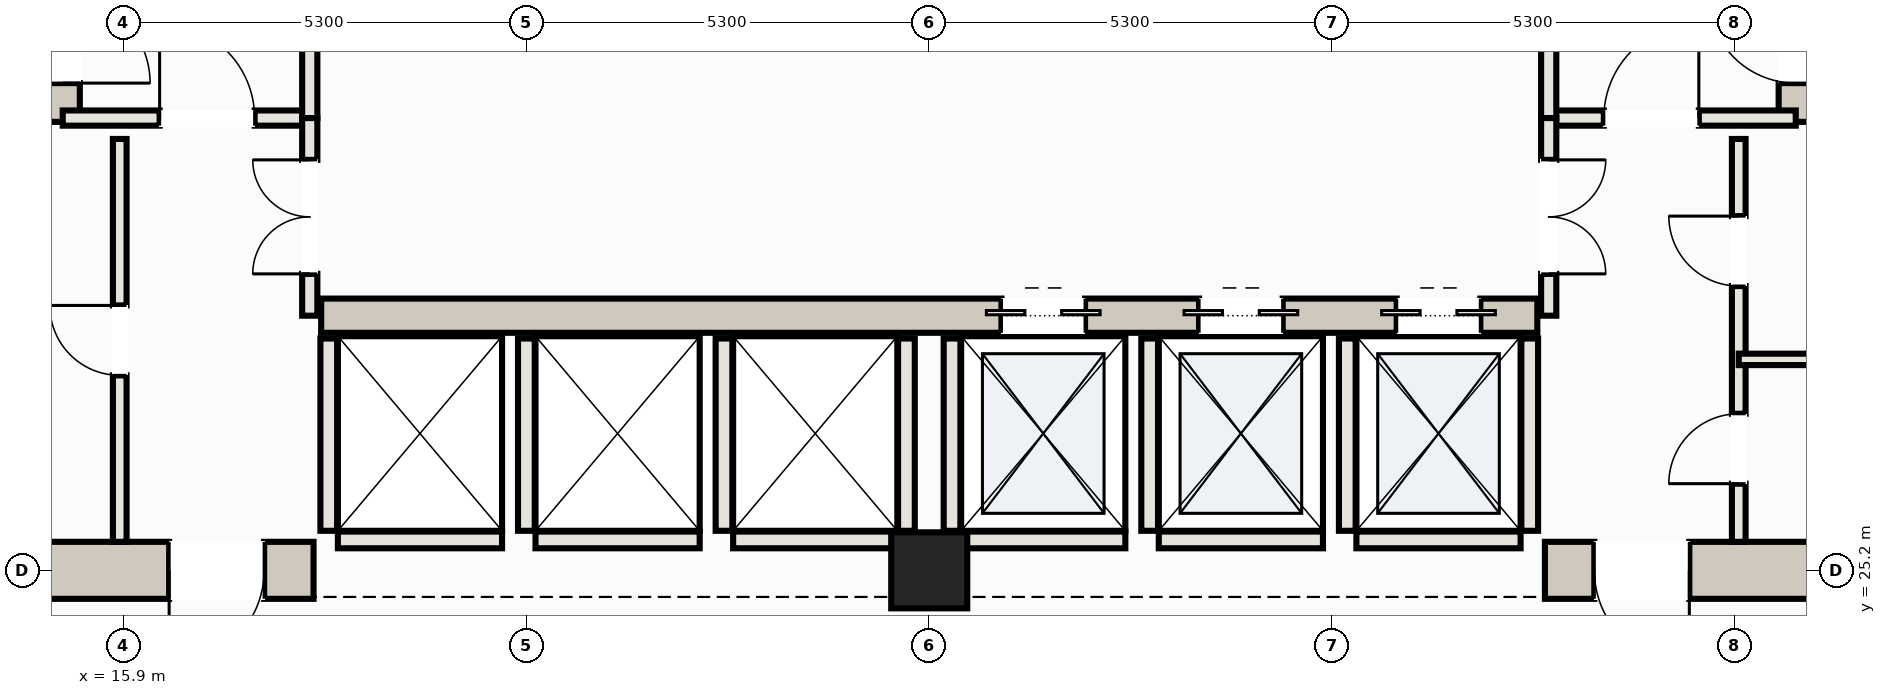
"""IFC4 building model, lengths in metres.
Left out: names, types, materials, properties, quantities, classifications, styles, units other than length and angle.
Written with IfcOpenShell. Run it as: python <this file> out.ifc"""

import sys

from ifc_helpers import new_model, si_unit, direction, frame, frame_2d, origin, origin_2d, place, context, subcontext, project, spatial, rectangle, hollow_rectangle, extrude, element, fill, save


model = new_model("IFC4")
c1 = context("Model", 3, precision=1e-05, world=origin(), true_north=direction((0.0, 1.0)))
c2 = subcontext(c1, "Body", "Model", "MODEL_VIEW")
j1 = project(units=[si_unit("LENGTHUNIT", "METRE"), si_unit("PLANEANGLEUNIT", "RADIAN")], contexts=[c1])
p1 = place(None, origin())
s1 = spatial("IfcSite", under=j1, at=p1, CompositionType="ELEMENT")
p2 = place(p1, origin())
s2 = spatial("IfcBuilding", under=s1, at=p2, CompositionType="ELEMENT")
p3 = place(p2, frame((0.0, 0.0, 81.7)))
s3 = spatial("IfcBuildingStorey", under=s2, at=p3, CompositionType="ELEMENT", Elevation=81.7)
p4 = place(p3, frame((10.225, 25.2, 0.0), z_axis=(0.0, 0.0, 1.0), x_axis=(1.0, 0.0, 0.0)))
e1 = element("IfcWall", 1, at=p4, inside=s3, PredefinedType="SHEAR", context=c2, shape_type="SweptSolid", body=[
    extrude(rectangle(XDim=8.175, YDim=0.75, at=frame_2d((4.087, 0.0))), origin(), (0.0, 0.0, 1.0), 3.09),
])
p5 = place(p4, frame((6.275, 0.0, 0.0)))
e2 = element("IfcOpeningElement", 2, at=p5, cuts=e1, PredefinedType="OPENING", context=c2, shape_type="SweptSolid", body=[
    extrude(rectangle(XDim=1.25, YDim=2.2, at=frame_2d((0.625, 1.1))), frame((0.0, 0.385, 0.0), z_axis=(0.0, -1.0, 0.0), x_axis=(1.0, 0.0, 0.0)), (0.0, 0.0, 1.0), 0.77),
])
p6 = place(p3, frame((34.6, 25.2, 0.0), z_axis=(0.0, 0.0, 1.0), x_axis=(1.0, 0.0, 0.0)))
e3 = element("IfcWall", 3, at=p6, inside=s3, PredefinedType="SHEAR", context=c2, shape_type="SweptSolid", body=[
    extrude(rectangle(XDim=8.175, YDim=0.75, at=frame_2d((4.087, 0.0))), origin(), (0.0, 0.0, 1.0), 3.09),
])
p7 = place(p6, frame((0.65, 0.0, 0.0)))
e4 = element("IfcOpeningElement", 4, at=p7, cuts=e3, PredefinedType="OPENING", context=c2, shape_type="SweptSolid", body=[
    extrude(rectangle(XDim=1.25, YDim=2.2, at=frame_2d((0.625, 1.1))), frame((0.0, 0.385, 0.0), z_axis=(0.0, -1.0, 0.0), x_axis=(1.0, 0.0, 0.0)), (0.0, 0.0, 1.0), 0.77),
])
p8 = place(p3, frame((15.1, 31.1, 0.0), z_axis=(0.0, 0.0, 1.0), x_axis=(0.0, 1.0, 0.0)))
e5 = element("IfcWall", 5, at=p8, inside=s3, PredefinedType="SHEAR", context=c2, shape_type="SweptSolid", body=[
    extrude(rectangle(XDim=8.525, YDim=0.45, at=frame_2d((4.262, 0.0))), origin(), (0.0, 0.0, 1.0), 3.09),
])
p9 = place(p8, frame((0.51, 0.0, 0.0)))
e6 = element("IfcOpeningElement", 6, at=p9, cuts=e5, PredefinedType="OPENING", context=c2, shape_type="SweptSolid", body=[
    extrude(rectangle(XDim=1.15, YDim=2.2, at=frame_2d((0.575, 1.1))), frame((0.0, 0.235, 0.0), z_axis=(0.0, -1.0, 0.0), x_axis=(1.0, 0.0, 0.0)), (0.0, 0.0, 1.0), 0.47),
])
p10 = place(p3, frame((37.9, 31.1, 0.0), z_axis=(0.0, 0.0, 1.0), x_axis=(0.0, 1.0, 0.0)))
e7 = element("IfcWall", 7, at=p10, inside=s3, PredefinedType="SHEAR", context=c2, shape_type="SweptSolid", body=[
    extrude(rectangle(XDim=8.525, YDim=0.45, at=frame_2d((4.262, 0.0))), origin(), (0.0, 0.0, 1.0), 3.09),
])
p11 = place(p10, frame((0.51, 0.0, 0.0)))
e8 = element("IfcOpeningElement", 8, at=p11, cuts=e7, PredefinedType="OPENING", context=c2, shape_type="SweptSolid", body=[
    extrude(rectangle(XDim=1.15, YDim=2.2, at=frame_2d((0.575, 1.1))), frame((0.0, 0.235, 0.0), z_axis=(0.0, -1.0, 0.0), x_axis=(1.0, 0.0, 0.0)), (0.0, 0.0, 1.0), 0.47),
])
p12 = place(p3, frame((18.5, 28.55, 0.0), z_axis=(0.0, 0.0, 1.0), x_axis=(1.0, 0.0, 0.0)))
e9 = element("IfcWall", 9, at=p12, inside=s3, PredefinedType="SHEAR", context=c2, shape_type="SweptSolid", body=[
    extrude(rectangle(XDim=16.0, YDim=0.45, at=frame_2d((8.0, 0.0))), origin(), (0.0, 0.0, 1.0), 3.09),
])
p13 = place(p12, frame((8.95, 0.0, 0.0)))
e10 = element("IfcOpeningElement", 10, at=p13, cuts=e9, PredefinedType="OPENING", context=c2, shape_type="SweptSolid", body=[
    extrude(rectangle(XDim=1.1, YDim=2.15, at=frame_2d((0.55, 1.075))), frame((0.0, 0.235, 0.0), z_axis=(0.0, -1.0, 0.0), x_axis=(1.0, 0.0, 0.0)), (0.0, 0.0, 1.0), 0.47),
])
p14 = place(p12, frame((11.55, 0.0, 0.0)))
e11 = element("IfcOpeningElement", 11, at=p14, cuts=e9, PredefinedType="OPENING", context=c2, shape_type="SweptSolid", body=[
    extrude(rectangle(XDim=1.1, YDim=2.15, at=frame_2d((0.55, 1.075))), frame((0.0, 0.235, 0.0), z_axis=(0.0, -1.0, 0.0), x_axis=(1.0, 0.0, 0.0)), (0.0, 0.0, 1.0), 0.47),
])
p15 = place(p12, frame((14.15, 0.0, 0.0)))
e12 = element("IfcOpeningElement", 12, at=p15, cuts=e9, PredefinedType="OPENING", context=c2, shape_type="SweptSolid", body=[
    extrude(rectangle(XDim=1.1, YDim=2.15, at=frame_2d((0.55, 1.075))), frame((0.0, 0.235, 0.0), z_axis=(0.0, -1.0, 0.0), x_axis=(1.0, 0.0, 0.0)), (0.0, 0.0, 1.0), 0.47),
])
p16 = place(p3, frame((26.5, 25.2, 0.0), z_axis=(0.0, 0.0, 1.0), x_axis=(1.0, 0.0, 0.0)))
e13 = element("IfcColumn", 13, at=p16, inside=s3, PredefinedType="COLUMN", context=c2, shape_type="SweptSolid", body=[
    extrude(hollow_rectangle(XDim=1.0, YDim=1.0, WallThickness=0.036, at=origin_2d()), origin(), (0.0, 0.0, 1.0), 3.3),
])
p17 = place(p3, frame((18.6, 25.72, 0.0), z_axis=(0.0, 0.0, 1.0), x_axis=(0.0, 1.0, 0.0)))
e14 = element("IfcWall", 14, at=p17, inside=s3, PredefinedType="SOLIDWALL", context=c2, shape_type="SweptSolid", body=[
    extrude(rectangle(XDim=2.53, YDim=0.22, at=frame_2d((1.265, 0.0))), origin(), (0.0, 0.0, 1.0), 3.09),
])
p18 = place(p3, frame((18.72, 25.6, 0.0), z_axis=(0.0, 0.0, 1.0), x_axis=(1.0, 0.0, 0.0)))
e15 = element("IfcWall", 15, at=p18, inside=s3, PredefinedType="SOLIDWALL", context=c2, shape_type="SweptSolid", body=[
    extrude(rectangle(XDim=2.16, YDim=0.22, at=frame_2d((1.08, 0.0))), origin(), (0.0, 0.0, 1.0), 3.09),
])
p19 = place(p3, frame((21.2, 25.72, 0.0), z_axis=(0.0, 0.0, 1.0), x_axis=(0.0, 1.0, 0.0)))
e16 = element("IfcWall", 16, at=p19, inside=s3, PredefinedType="SOLIDWALL", context=c2, shape_type="SweptSolid", body=[
    extrude(rectangle(XDim=2.53, YDim=0.22, at=frame_2d((1.265, 0.0))), origin(), (0.0, 0.0, 1.0), 3.09),
])
p20 = place(p3, frame((21.32, 25.6, 0.0), z_axis=(0.0, 0.0, 1.0), x_axis=(1.0, 0.0, 0.0)))
e17 = element("IfcWall", 17, at=p20, inside=s3, PredefinedType="SOLIDWALL", context=c2, shape_type="SweptSolid", body=[
    extrude(rectangle(XDim=2.16, YDim=0.22, at=frame_2d((1.08, 0.0))), origin(), (0.0, 0.0, 1.0), 3.09),
])
for number, where, z_axis, x_axis in (
    (18, (23.8, 25.72, 0.0), (0.0, 0.0, 1.0), (0.0, 1.0, 0.0)),
    (19, (26.2, 25.72, 0.0), (0.0, 0.0, 1.0), (0.0, 1.0, 0.0)),
):
    element("IfcWall", number, at=place(p3, frame(where, z_axis=z_axis, x_axis=x_axis)), inside=s3, PredefinedType="SOLIDWALL", context=c2, shape_type="SweptSolid", body=[
        extrude(rectangle(XDim=2.53, YDim=0.22, at=frame_2d((1.265, 0.0))), origin(), (0.0, 0.0, 1.0), 3.09),
    ])
p21 = place(p3, frame((23.92, 25.6, 0.0), z_axis=(0.0, 0.0, 1.0), x_axis=(1.0, 0.0, 0.0)))
e20 = element("IfcWall", 20, at=p21, inside=s3, PredefinedType="SOLIDWALL", context=c2, shape_type="SweptSolid", body=[
    extrude(rectangle(XDim=2.16, YDim=0.22, at=frame_2d((1.08, 0.0))), origin(), (0.0, 0.0, 1.0), 3.09),
])
p22 = place(p3, frame((26.8, 25.72, 0.0), z_axis=(0.0, 0.0, 1.0), x_axis=(0.0, 1.0, 0.0)))
e21 = element("IfcWall", 21, at=p22, inside=s3, PredefinedType="SOLIDWALL", context=c2, shape_type="SweptSolid", body=[
    extrude(rectangle(XDim=2.53, YDim=0.22, at=frame_2d((1.265, 0.0))), origin(), (0.0, 0.0, 1.0), 3.09),
])
p23 = place(p3, frame((26.92, 25.6, 0.0), z_axis=(0.0, 0.0, 1.0), x_axis=(1.0, 0.0, 0.0)))
e22 = element("IfcWall", 22, at=p23, inside=s3, PredefinedType="SOLIDWALL", context=c2, shape_type="SweptSolid", body=[
    extrude(rectangle(XDim=2.16, YDim=0.22, at=frame_2d((1.08, 0.0))), origin(), (0.0, 0.0, 1.0), 3.09),
])
p24 = place(p3, frame((29.4, 25.72, 0.0), z_axis=(0.0, 0.0, 1.0), x_axis=(0.0, 1.0, 0.0)))
e23 = element("IfcWall", 23, at=p24, inside=s3, PredefinedType="SOLIDWALL", context=c2, shape_type="SweptSolid", body=[
    extrude(rectangle(XDim=2.53, YDim=0.22, at=frame_2d((1.265, 0.0))), origin(), (0.0, 0.0, 1.0), 3.09),
])
p25 = place(p3, frame((29.52, 25.6, 0.0), z_axis=(0.0, 0.0, 1.0), x_axis=(1.0, 0.0, 0.0)))
e24 = element("IfcWall", 24, at=p25, inside=s3, PredefinedType="SOLIDWALL", context=c2, shape_type="SweptSolid", body=[
    extrude(rectangle(XDim=2.16, YDim=0.22, at=frame_2d((1.08, 0.0))), origin(), (0.0, 0.0, 1.0), 3.09),
])
for number, where, z_axis, x_axis in (
    (25, (32.0, 25.72, 0.0), (0.0, 0.0, 1.0), (0.0, 1.0, 0.0)),
    (26, (34.4, 25.72, 0.0), (0.0, 0.0, 1.0), (0.0, 1.0, 0.0)),
):
    element("IfcWall", number, at=place(p3, frame(where, z_axis=z_axis, x_axis=x_axis)), inside=s3, PredefinedType="SOLIDWALL", context=c2, shape_type="SweptSolid", body=[
        extrude(rectangle(XDim=2.53, YDim=0.22, at=frame_2d((1.265, 0.0))), origin(), (0.0, 0.0, 1.0), 3.09),
    ])
p26 = place(p3, frame((32.12, 25.6, 0.0), z_axis=(0.0, 0.0, 1.0), x_axis=(1.0, 0.0, 0.0)))
e27 = element("IfcWall", 27, at=p26, inside=s3, PredefinedType="SOLIDWALL", context=c2, shape_type="SweptSolid", body=[
    extrude(rectangle(XDim=2.16, YDim=0.22, at=frame_2d((1.08, 0.0))), origin(), (0.0, 0.0, 1.0), 3.09),
])
p27 = place(p3, frame((15.1, 31.15, 0.0), z_axis=(0.0, 0.0, 1.0), x_axis=(1.0, 0.0, 0.0)))
e28 = element("IfcWall", 28, at=p27, inside=s3, PredefinedType="PARTITIONING", context=c2, shape_type="SweptSolid", body=[
    extrude(rectangle(XDim=3.25, YDim=0.2, at=frame_2d((1.625, 0.0))), origin(), (0.0, 0.0, 1.0), 2.38),
])
p28 = place(p27, frame((1.275, 0.0, 0.0)))
e29 = element("IfcOpeningElement", 29, at=p28, cuts=e28, PredefinedType="OPENING", context=c2, shape_type="SweptSolid", body=[
    extrude(rectangle(XDim=1.25, YDim=2.2, at=frame_2d((0.625, 1.1))), frame((0.0, 0.11, 0.0), z_axis=(0.0, -1.0, 0.0), x_axis=(1.0, 0.0, 0.0)), (0.0, 0.0, 1.0), 0.22),
])
p29 = place(p3, frame((18.35, 31.15, 0.0), z_axis=(0.0, 0.0, 1.0), x_axis=(0.0, 1.0, 0.0)))
e30 = element("IfcWall", 30, at=p29, inside=s3, PredefinedType="PARTITIONING", context=c2, shape_type="SweptSolid", body=[
    extrude(rectangle(XDim=5.15, YDim=0.2, at=frame_2d((2.575, 0.0))), origin(), (0.0, 0.0, 1.0), 2.38),
])
p30 = place(p29, frame((1.875, 0.0, 0.0)))
e31 = element("IfcOpeningElement", 31, at=p30, cuts=e30, PredefinedType="OPENING", context=c2, shape_type="SweptSolid", body=[
    extrude(rectangle(XDim=1.25, YDim=2.2, at=frame_2d((0.625, 1.1))), frame((0.0, 0.11, 0.0), z_axis=(0.0, -1.0, 0.0), x_axis=(1.0, 0.0, 0.0)), (0.0, 0.0, 1.0), 0.22),
])
p31 = place(p3, frame((34.65, 31.15, 0.0), z_axis=(0.0, 0.0, 1.0), x_axis=(1.0, 0.0, 0.0)))
e32 = element("IfcWall", 32, at=p31, inside=s3, PredefinedType="PARTITIONING", context=c2, shape_type="SweptSolid", body=[
    extrude(rectangle(XDim=3.25, YDim=0.2, at=frame_2d((1.625, 0.0))), origin(), (0.0, 0.0, 1.0), 2.38),
])
p32 = place(p31, frame((0.725, 0.0, 0.0)))
e33 = element("IfcOpeningElement", 33, at=p32, cuts=e32, PredefinedType="OPENING", context=c2, shape_type="SweptSolid", body=[
    extrude(rectangle(XDim=1.25, YDim=2.2, at=frame_2d((0.625, 1.1))), frame((0.0, 0.11, 0.0), z_axis=(0.0, -1.0, 0.0), x_axis=(1.0, 0.0, 0.0)), (0.0, 0.0, 1.0), 0.22),
])
p33 = place(p3, frame((34.65, 31.15, 0.0), z_axis=(0.0, 0.0, 1.0), x_axis=(0.0, 1.0, 0.0)))
e34 = element("IfcWall", 34, at=p33, inside=s3, PredefinedType="PARTITIONING", context=c2, shape_type="SweptSolid", body=[
    extrude(rectangle(XDim=5.15, YDim=0.2, at=frame_2d((2.575, 0.0))), origin(), (0.0, 0.0, 1.0), 2.38),
])
p34 = place(p33, frame((1.875, 0.0, 0.0)))
e35 = element("IfcOpeningElement", 35, at=p34, cuts=e34, PredefinedType="OPENING", context=c2, shape_type="SweptSolid", body=[
    extrude(rectangle(XDim=1.25, YDim=2.2, at=frame_2d((0.625, 1.1))), frame((0.0, 0.11, 0.0), z_axis=(0.0, -1.0, 0.0), x_axis=(1.0, 0.0, 0.0)), (0.0, 0.0, 1.0), 0.22),
])
p35 = place(p3, frame((15.85, 25.575, 0.0), z_axis=(0.0, 0.0, 1.0), x_axis=(0.0, 1.0, 0.0)))
e36 = element("IfcWall", 36, at=p35, inside=s3, PredefinedType="PARTITIONING", context=c2, shape_type="SweptSolid", body=[
    extrude(rectangle(XDim=5.3, YDim=0.18, at=frame_2d((2.65, 0.0))), origin(), (0.0, 0.0, 1.0), 2.38),
])
p36 = place(p35, frame((2.19, 0.0, 0.0)))
e37 = element("IfcOpeningElement", 37, at=p36, cuts=e36, PredefinedType="OPENING", context=c2, shape_type="SweptSolid", body=[
    extrude(rectangle(XDim=0.92, YDim=2.15, at=frame_2d((0.46, 1.075))), frame((0.0, 0.1, 0.0), z_axis=(0.0, -1.0, 0.0), x_axis=(1.0, 0.0, 0.0)), (0.0, 0.0, 1.0), 0.2),
])
p37 = place(p3, frame((37.15, 25.575, 0.0), z_axis=(0.0, 0.0, 1.0), x_axis=(0.0, 1.0, 0.0)))
e38 = element("IfcWall", 38, at=p37, inside=s3, PredefinedType="PARTITIONING", context=c2, shape_type="SweptSolid", body=[
    extrude(rectangle(XDim=5.3, YDim=0.18, at=frame_2d((2.65, 0.0))), origin(), (0.0, 0.0, 1.0), 2.38),
])
p38 = place(p37, frame((0.765, 0.0, 0.0)))
e39 = element("IfcOpeningElement", 39, at=p38, cuts=e38, PredefinedType="OPENING", context=c2, shape_type="SweptSolid", body=[
    extrude(rectangle(XDim=0.92, YDim=2.15, at=frame_2d((0.46, 1.075))), frame((0.0, 0.1, 0.0), z_axis=(0.0, -1.0, 0.0), x_axis=(1.0, 0.0, 0.0)), (0.0, 0.0, 1.0), 0.2),
])
p39 = place(p37, frame((3.365, 0.0, 0.0)))
e40 = element("IfcOpeningElement", 40, at=p39, cuts=e38, PredefinedType="OPENING", context=c2, shape_type="SweptSolid", body=[
    extrude(rectangle(XDim=0.92, YDim=2.15, at=frame_2d((0.46, 1.075))), frame((0.0, 0.1, 0.0), z_axis=(0.0, -1.0, 0.0), x_axis=(1.0, 0.0, 0.0)), (0.0, 0.0, 1.0), 0.2),
])
p40 = place(p3, frame((37.15, 27.975, 0.0), z_axis=(0.0, 0.0, 1.0), x_axis=(1.0, 0.0, 0.0)))
e41 = element("IfcWall", 41, at=p40, inside=s3, PredefinedType="PARTITIONING", context=c2, shape_type="SweptSolid", body=[
    extrude(rectangle(XDim=4.875, YDim=0.15, at=frame_2d((2.438, 0.0))), origin(), (0.0, 0.0, 1.0), 2.38),
])
p41 = place(p3, frame((18.35, 28.55, 0.0), z_axis=(0.0, 0.0, 1.0), x_axis=(0.0, 1.0, 0.0)))
e42 = element("IfcWall", 42, at=p41, inside=s3, PredefinedType="PARTITIONING", context=c2, shape_type="SweptSolid", body=[
    extrude(rectangle(XDim=2.6, YDim=0.2, at=frame_2d((1.3, 0.0))), origin(), (0.0, 0.0, 1.0), 2.38),
])
p42 = place(p41, frame((0.55, 0.0, 0.0)))
e43 = element("IfcOpeningElement", 43, at=p42, cuts=e42, PredefinedType="OPENING", context=c2, shape_type="SweptSolid", body=[
    extrude(rectangle(XDim=1.5, YDim=2.25, at=frame_2d((0.75, 1.125))), frame((0.0, 0.11, 0.0), z_axis=(0.0, -1.0, 0.0), x_axis=(1.0, 0.0, 0.0)), (0.0, 0.0, 1.0), 0.22),
])
p43 = place(p3, frame((34.65, 28.55, 0.0), z_axis=(0.0, 0.0, 1.0), x_axis=(0.0, 1.0, 0.0)))
e44 = element("IfcWall", 44, at=p43, inside=s3, PredefinedType="PARTITIONING", context=c2, shape_type="SweptSolid", body=[
    extrude(rectangle(XDim=2.6, YDim=0.2, at=frame_2d((1.3, 0.0))), origin(), (0.0, 0.0, 1.0), 2.38),
])
p44 = place(p43, frame((0.55, 0.0, 0.0)))
e45 = element("IfcOpeningElement", 45, at=p44, cuts=e44, PredefinedType="OPENING", context=c2, shape_type="SweptSolid", body=[
    extrude(rectangle(XDim=1.5, YDim=2.25, at=frame_2d((0.75, 1.125))), frame((0.0, 0.11, 0.0), z_axis=(0.0, -1.0, 0.0), x_axis=(1.0, 0.0, 0.0)), (0.0, 0.0, 1.0), 0.22),
])
p45 = place(p13, origin())
e46 = element("IfcDoor", 46, at=p45, inside=s3, OperationType="DOUBLE_DOOR_SLIDING", PredefinedType="DOOR", context=c2, shape_type="SweptSolid", body=[
    extrude(rectangle(XDim=1.1, YDim=2.15, at=frame_2d((0.55, 1.075))), frame((0.0, 0.025, 0.0), z_axis=(0.0, -1.0, 0.0), x_axis=(1.0, 0.0, 0.0)), (0.0, 0.0, 1.0), 0.05),
])
fill(e10, e46)
p46 = place(p14, origin())
e47 = element("IfcDoor", 47, at=p46, inside=s3, OperationType="DOUBLE_DOOR_SLIDING", PredefinedType="DOOR", context=c2, shape_type="SweptSolid", body=[
    extrude(rectangle(XDim=1.1, YDim=2.15, at=frame_2d((0.55, 1.075))), frame((0.0, 0.025, 0.0), z_axis=(0.0, -1.0, 0.0), x_axis=(1.0, 0.0, 0.0)), (0.0, 0.0, 1.0), 0.05),
])
fill(e11, e47)
p47 = place(p15, origin())
e48 = element("IfcDoor", 48, at=p47, inside=s3, OperationType="DOUBLE_DOOR_SLIDING", PredefinedType="DOOR", context=c2, shape_type="SweptSolid", body=[
    extrude(rectangle(XDim=1.1, YDim=2.15, at=frame_2d((0.55, 1.075))), frame((0.0, 0.025, 0.0), z_axis=(0.0, -1.0, 0.0), x_axis=(1.0, 0.0, 0.0)), (0.0, 0.0, 1.0), 0.05),
])
fill(e12, e48)
p48 = place(p5, frame((1.25, 0.0, 0.0), z_axis=(0.0, 0.0, 1.0), x_axis=(-1.0, 0.0, 0.0)))
e49 = element("IfcDoor", 49, at=p48, inside=s3, OperationType="SINGLE_SWING_RIGHT", PredefinedType="DOOR", context=c2, shape_type="SweptSolid", body=[
    extrude(rectangle(XDim=1.25, YDim=2.2, at=frame_2d((0.625, 1.1))), frame((0.0, 0.025, 0.0), z_axis=(0.0, -1.0, 0.0), x_axis=(1.0, 0.0, 0.0)), (0.0, 0.0, 1.0), 0.05),
])
fill(e2, e49)
p49 = place(p7, frame((1.25, 0.0, 0.0), z_axis=(0.0, 0.0, 1.0), x_axis=(-1.0, 0.0, 0.0)))
e50 = element("IfcDoor", 50, at=p49, inside=s3, OperationType="SINGLE_SWING_LEFT", PredefinedType="DOOR", context=c2, shape_type="SweptSolid", body=[
    extrude(rectangle(XDim=1.25, YDim=2.2, at=frame_2d((0.625, 1.1))), frame((0.0, 0.025, 0.0), z_axis=(0.0, -1.0, 0.0), x_axis=(1.0, 0.0, 0.0)), (0.0, 0.0, 1.0), 0.05),
])
fill(e4, e50)
p50 = place(p28, origin())
e51 = element("IfcDoor", 51, at=p50, inside=s3, OperationType="SINGLE_SWING_LEFT", PredefinedType="DOOR", context=c2, shape_type="SweptSolid", body=[
    extrude(rectangle(XDim=1.25, YDim=2.2, at=frame_2d((0.625, 1.1))), frame((0.0, 0.025, 0.0), z_axis=(0.0, -1.0, 0.0), x_axis=(1.0, 0.0, 0.0)), (0.0, 0.0, 1.0), 0.05),
])
fill(e29, e51)
p51 = place(p32, origin())
e52 = element("IfcDoor", 52, at=p51, inside=s3, OperationType="SINGLE_SWING_RIGHT", PredefinedType="DOOR", context=c2, shape_type="SweptSolid", body=[
    extrude(rectangle(XDim=1.25, YDim=2.2, at=frame_2d((0.625, 1.1))), frame((0.0, 0.025, 0.0), z_axis=(0.0, -1.0, 0.0), x_axis=(1.0, 0.0, 0.0)), (0.0, 0.0, 1.0), 0.05),
])
fill(e33, e52)
p52 = place(p9, frame((1.15, 0.0, 0.0), z_axis=(0.0, 0.0, 1.0), x_axis=(-1.0, 0.0, 0.0)))
e53 = element("IfcDoor", 53, at=p52, inside=s3, OperationType="SINGLE_SWING_RIGHT", PredefinedType="DOOR", context=c2, shape_type="SweptSolid", body=[
    extrude(rectangle(XDim=1.15, YDim=2.2, at=frame_2d((0.575, 1.1))), frame((0.0, 0.025, 0.0), z_axis=(0.0, -1.0, 0.0), x_axis=(1.0, 0.0, 0.0)), (0.0, 0.0, 1.0), 0.05),
])
fill(e6, e53)
p53 = place(p11, origin())
e54 = element("IfcDoor", 54, at=p53, inside=s3, OperationType="SINGLE_SWING_RIGHT", PredefinedType="DOOR", context=c2, shape_type="SweptSolid", body=[
    extrude(rectangle(XDim=1.15, YDim=2.2, at=frame_2d((0.575, 1.1))), frame((0.0, 0.025, 0.0), z_axis=(0.0, -1.0, 0.0), x_axis=(1.0, 0.0, 0.0)), (0.0, 0.0, 1.0), 0.05),
])
fill(e8, e54)
p54 = place(p36, origin())
e55 = element("IfcDoor", 55, at=p54, inside=s3, OperationType="SINGLE_SWING_RIGHT", PredefinedType="DOOR", context=c2, shape_type="SweptSolid", body=[
    extrude(rectangle(XDim=0.92, YDim=2.15, at=frame_2d((0.46, 1.075))), frame((0.0, 0.025, 0.0), z_axis=(0.0, -1.0, 0.0), x_axis=(1.0, 0.0, 0.0)), (0.0, 0.0, 1.0), 0.05),
])
fill(e37, e55)
p55 = place(p38, origin())
e56 = element("IfcDoor", 56, at=p55, inside=s3, OperationType="SINGLE_SWING_LEFT", PredefinedType="DOOR", context=c2, shape_type="SweptSolid", body=[
    extrude(rectangle(XDim=0.92, YDim=2.15, at=frame_2d((0.46, 1.075))), frame((0.0, 0.025, 0.0), z_axis=(0.0, -1.0, 0.0), x_axis=(1.0, 0.0, 0.0)), (0.0, 0.0, 1.0), 0.05),
])
fill(e39, e56)
p56 = place(p39, origin())
e57 = element("IfcDoor", 57, at=p56, inside=s3, OperationType="SINGLE_SWING_RIGHT", PredefinedType="DOOR", context=c2, shape_type="SweptSolid", body=[
    extrude(rectangle(XDim=0.92, YDim=2.15, at=frame_2d((0.46, 1.075))), frame((0.0, 0.025, 0.0), z_axis=(0.0, -1.0, 0.0), x_axis=(1.0, 0.0, 0.0)), (0.0, 0.0, 1.0), 0.05),
])
fill(e40, e57)
p57 = place(p42, origin())
e58 = element("IfcDoor", 58, at=p57, inside=s3, OperationType="DOUBLE_DOOR_SINGLE_SWING", PredefinedType="DOOR", context=c2, shape_type="SweptSolid", body=[
    extrude(rectangle(XDim=1.5, YDim=2.25, at=frame_2d((0.75, 1.125))), frame((0.0, 0.025, 0.0), z_axis=(0.0, -1.0, 0.0), x_axis=(1.0, 0.0, 0.0)), (0.0, 0.0, 1.0), 0.05),
])
fill(e43, e58)
p58 = place(p44, frame((1.5, 0.0, 0.0), z_axis=(0.0, 0.0, 1.0), x_axis=(-1.0, 0.0, 0.0)))
e59 = element("IfcDoor", 59, at=p58, inside=s3, OperationType="DOUBLE_DOOR_SINGLE_SWING", PredefinedType="DOOR", context=c2, shape_type="SweptSolid", body=[
    extrude(rectangle(XDim=1.5, YDim=2.25, at=frame_2d((0.75, 1.125))), frame((0.0, 0.025, 0.0), z_axis=(0.0, -1.0, 0.0), x_axis=(1.0, 0.0, 0.0)), (0.0, 0.0, 1.0), 0.05),
])
fill(e45, e59)
save(model, sys.argv[1])
